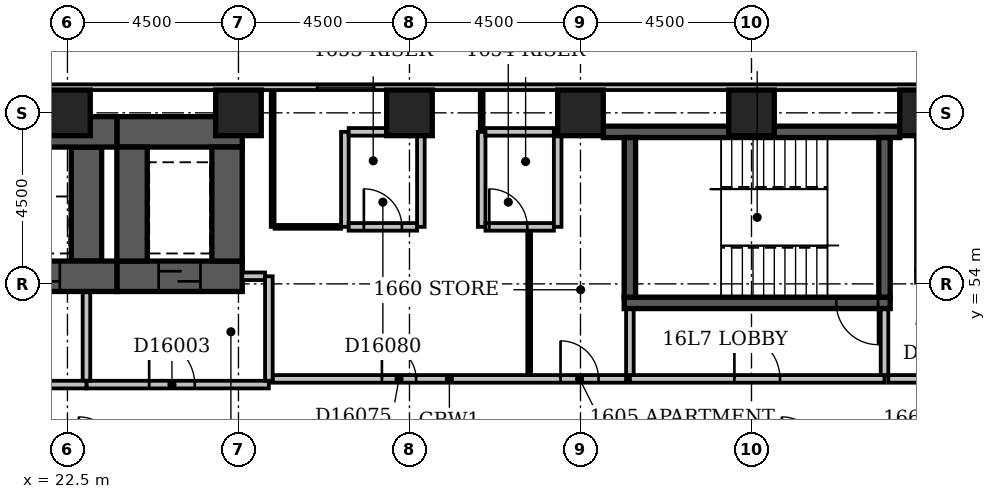
"""IFC4 building model, lengths in metres.
Left out: names, types, materials, properties, quantities, classifications, styles, units other than length and angle.
Written with IfcOpenShell. Run it as: python <this file> out.ifc"""

import sys

from ifc_helpers import new_model, si_unit, direction, frame, frame_2d, origin, origin_2d, place, context, subcontext, project, spatial, rectangle, extrude, element, fill, save


model = new_model("IFC4")
c1 = context("Model", 3, precision=1e-05, world=origin(), true_north=direction((0.0, 1.0)))
c2 = subcontext(c1, "Body", "Model", "MODEL_VIEW")
j1 = project(units=[si_unit("LENGTHUNIT", "METRE"), si_unit("PLANEANGLEUNIT", "RADIAN")], contexts=[c1])
p1 = place(None, origin())
s1 = spatial("IfcSite", under=j1, at=p1, CompositionType="ELEMENT")
p2 = place(p1, origin())
s2 = spatial("IfcBuilding", under=s1, at=p2, CompositionType="ELEMENT")
p3 = place(p2, frame((0.0, 0.0, 68.6)))
s3 = spatial("IfcBuildingStorey", under=s2, at=p3, CompositionType="ELEMENT", Elevation=68.6)
p4 = place(p3, frame((7.35, 54.2, -0.3), z_axis=(0.0, 0.0, 1.0), x_axis=(1.0, 0.0, 0.0)))
e1 = element("IfcWall", 1, at=p4, inside=s3, PredefinedType="SHEAR", context=c2, shape_type="SweptSolid", body=[
    extrude(rectangle(XDim=16.45, YDim=0.8, at=frame_2d((8.225, 0.0))), origin(), (0.0, 0.0, 1.0), 3.6),
])
p5 = place(p4, frame((1.35, 0.0, 0.3)))
e2 = element("IfcOpeningElement", 2, at=p5, cuts=e1, PredefinedType="OPENING", context=c2, shape_type="SweptSolid", body=[
    extrude(rectangle(XDim=1.1, YDim=2.1, at=frame_2d((0.55, 1.05))), frame((0.0, 0.412, 0.0), z_axis=(0.0, -1.0, 0.0), x_axis=(1.0, 0.0, 0.0)), (0.0, 0.0, 1.0), 0.824),
])
p6 = place(p4, frame((3.85, 0.0, 0.3)))
e3 = element("IfcOpeningElement", 3, at=p6, cuts=e1, PredefinedType="OPENING", context=c2, shape_type="SweptSolid", body=[
    extrude(rectangle(XDim=1.1, YDim=2.1, at=frame_2d((0.55, 1.05))), frame((0.0, 0.412, 0.0), z_axis=(0.0, -1.0, 0.0), x_axis=(1.0, 0.0, 0.0)), (0.0, 0.0, 1.0), 0.824),
])
p7 = place(p4, frame((6.35, 0.0, 0.3)))
e4 = element("IfcOpeningElement", 4, at=p7, cuts=e1, PredefinedType="OPENING", context=c2, shape_type="SweptSolid", body=[
    extrude(rectangle(XDim=1.1, YDim=2.1, at=frame_2d((0.55, 1.05))), frame((0.0, 0.412, 0.0), z_axis=(0.0, -1.0, 0.0), x_axis=(1.0, 0.0, 0.0)), (0.0, 0.0, 1.0), 0.824),
])
p8 = place(p4, frame((8.85, 0.0, 0.3)))
e5 = element("IfcOpeningElement", 5, at=p8, cuts=e1, PredefinedType="OPENING", context=c2, shape_type="SweptSolid", body=[
    extrude(rectangle(XDim=1.1, YDim=2.1, at=frame_2d((0.55, 1.05))), frame((0.0, 0.412, 0.0), z_axis=(0.0, -1.0, 0.0), x_axis=(1.0, 0.0, 0.0)), (0.0, 0.0, 1.0), 0.824),
])
p9 = place(p4, frame((11.35, 0.0, 0.3)))
e6 = element("IfcOpeningElement", 6, at=p9, cuts=e1, PredefinedType="OPENING", context=c2, shape_type="SweptSolid", body=[
    extrude(rectangle(XDim=1.1, YDim=2.1, at=frame_2d((0.55, 1.05))), frame((0.0, 0.412, 0.0), z_axis=(0.0, -1.0, 0.0), x_axis=(1.0, 0.0, 0.0)), (0.0, 0.0, 1.0), 0.824),
])
p10 = place(p4, frame((13.85, 0.0, 0.3)))
e7 = element("IfcOpeningElement", 7, at=p10, cuts=e1, PredefinedType="OPENING", context=c2, shape_type="SweptSolid", body=[
    extrude(rectangle(XDim=1.1, YDim=2.1, at=frame_2d((0.55, 1.05))), frame((0.0, 0.412, 0.0), z_axis=(0.0, -1.0, 0.0), x_axis=(1.0, 0.0, 0.0)), (0.0, 0.0, 1.0), 0.824),
])
p11 = place(p3, frame((7.35, 58.0, -0.3), z_axis=(0.0, 0.0, 1.0), x_axis=(1.0, 0.0, 0.0)))
e8 = element("IfcWall", 8, at=p11, inside=s3, PredefinedType="SHEAR", context=c2, shape_type="SweptSolid", body=[
    extrude(rectangle(XDim=16.45, YDim=0.8, at=frame_2d((8.225, 0.0))), origin(), (0.0, 0.0, 1.0), 3.6),
])
p12 = place(p3, frame((23.0, 54.6, -0.3), z_axis=(0.0, 0.0, 1.0), x_axis=(0.0, 1.0, 0.0)))
e9 = element("IfcWall", 9, at=p12, inside=s3, PredefinedType="SHEAR", context=c2, shape_type="SweptSolid", body=[
    extrude(rectangle(XDim=3.0, YDim=0.8, at=frame_2d((1.5, 0.0))), origin(), (0.0, 0.0, 1.0), 3.6),
])
p13 = place(p3, frame((23.8, 54.2, -0.3), z_axis=(0.0, 0.0, 1.0), x_axis=(1.0, 0.0, 0.0)))
e10 = element("IfcWall", 10, at=p13, inside=s3, PredefinedType="SHEAR", context=c2, shape_type="SweptSolid", body=[
    extrude(rectangle(XDim=3.3, YDim=0.8, at=frame_2d((1.65, 0.0))), origin(), (0.0, 0.0, 1.0), 3.6),
])
p14 = place(p13, frame((1.1, 0.0, 0.3)))
e11 = element("IfcOpeningElement", 11, at=p14, cuts=e10, PredefinedType="OPENING", context=c2, shape_type="SweptSolid", body=[
    extrude(rectangle(XDim=1.1, YDim=2.1, at=frame_2d((0.55, 1.05))), frame((0.0, 0.412, 0.0), z_axis=(0.0, -1.0, 0.0), x_axis=(1.0, 0.0, 0.0)), (0.0, 0.0, 1.0), 0.824),
])
p15 = place(p3, frame((23.8, 58.0, -0.3), z_axis=(0.0, 0.0, 1.0), x_axis=(1.0, 0.0, 0.0)))
e12 = element("IfcWall", 12, at=p15, inside=s3, PredefinedType="SHEAR", context=c2, shape_type="SweptSolid", body=[
    extrude(rectangle(XDim=3.3, YDim=0.8, at=frame_2d((1.65, 0.0))), origin(), (0.0, 0.0, 1.0), 3.6),
])
for number, where, z_axis, x_axis in (
    (13, (24.2, 54.6, -0.3), (0.0, 0.0, 1.0), (0.0, 1.0, 0.0)),
    (14, (26.7, 54.6, -0.3), (0.0, 0.0, 1.0), (0.0, 1.0, 0.0)),
):
    element("IfcWall", number, at=place(p3, frame(where, z_axis=z_axis, x_axis=x_axis)), inside=s3, PredefinedType="SHEAR", context=c2, shape_type="SweptSolid", body=[
        extrude(rectangle(XDim=3.0, YDim=0.8, at=frame_2d((1.5, 0.0))), origin(), (0.0, 0.0, 1.0), 3.6),
    ])
p16 = place(p3, frame((36.6, 58.0, -0.3), z_axis=(0.0, 0.0, 1.0), x_axis=(1.0, 0.0, 0.0)))
e15 = element("IfcWall", 15, at=p16, inside=s3, PredefinedType="SHEAR", context=c2, shape_type="SweptSolid", body=[
    extrude(rectangle(XDim=7.8, YDim=0.3, at=frame_2d((3.9, 0.0))), origin(), (0.0, 0.0, 1.0), 3.6),
])
p17 = place(p3, frame((37.15, 53.5, -0.3), z_axis=(0.0, 0.0, 1.0), x_axis=(1.0, 0.0, 0.0)))
e16 = element("IfcWall", 16, at=p17, inside=s3, PredefinedType="SHEAR", context=c2, shape_type="SweptSolid", body=[
    extrude(rectangle(XDim=7.0, YDim=0.3, at=frame_2d((3.5, 0.0))), origin(), (0.0, 0.0, 1.0), 3.6),
])
p18 = place(p17, frame((5.58, 0.0, 0.3)))
e17 = element("IfcOpeningElement", 17, at=p18, cuts=e16, PredefinedType="OPENING", context=c2, shape_type="SweptSolid", body=[
    extrude(rectangle(XDim=1.1, YDim=2.1, at=frame_2d((0.55, 1.05))), frame((0.0, 0.162, 0.0), z_axis=(0.0, -1.0, 0.0), x_axis=(1.0, 0.0, 0.0)), (0.0, 0.0, 1.0), 0.324),
])
for number, where, z_axis, x_axis in (
    (18, (37.3, 53.65, -0.3), (0.0, 0.0, 1.0), (0.0, 1.0, 0.0)),
    (19, (44.0, 53.65, -0.3), (0.0, 0.0, 1.0), (0.0, 1.0, 0.0)),
):
    element("IfcWall", number, at=place(p3, frame(where, z_axis=z_axis, x_axis=x_axis)), inside=s3, PredefinedType="SHEAR", context=c2, shape_type="SweptSolid", body=[
        extrude(rectangle(XDim=4.2, YDim=0.3, at=frame_2d((2.1, 0.0))), origin(), (0.0, 0.0, 1.0), 3.6),
    ])
p19 = place(p3, frame((45.0, 54.35, -0.3), z_axis=(0.0, 0.0, 1.0), x_axis=(0.0, 1.0, 0.0)))
e20 = element("IfcWall", 20, at=p19, inside=s3, PredefinedType="SHEAR", context=c2, shape_type="SweptSolid", body=[
    extrude(rectangle(XDim=3.5, YDim=0.3, at=frame_2d((1.75, 0.0))), origin(), (0.0, 0.0, 1.0), 3.6),
])
for number, where, z_axis, x_axis in (
    (21, (22.5, 58.5, -0.3), (0.0, 0.0, 1.0), (1.0, 0.0, 0.0)),
    (22, (27.0, 58.5, -0.3), (0.0, 0.0, 1.0), (1.0, 0.0, 0.0)),
    (23, (31.5, 58.5, -0.3), (0.0, 0.0, 1.0), (1.0, 0.0, 0.0)),
    (24, (36.0, 58.5, -0.3), (0.0, 0.0, 1.0), (1.0, 0.0, 0.0)),
    (25, (40.5, 58.5, -0.3), (0.0, 0.0, 1.0), (1.0, 0.0, 0.0)),
    (26, (45.0, 58.5, -0.3), (0.0, 0.0, 1.0), (1.0, 0.0, 0.0)),
):
    element("IfcColumn", number, at=place(p3, frame(where, z_axis=z_axis, x_axis=x_axis)), inside=s3, PredefinedType="COLUMN", context=c2, shape_type="SweptSolid", body=[
        extrude(rectangle(XDim=1.2, YDim=1.2, at=origin_2d()), origin(), (0.0, 0.0, 1.0), 3.6),
    ])
p20 = place(p3, frame((68.1, 59.175, 0.0), z_axis=(0.0, 0.0, 1.0), x_axis=(-1.0, 0.0, 0.0)))
e27 = element("IfcWall", 27, at=p20, inside=s3, PredefinedType="STANDARD", context=c2, shape_type="SweptSolid", body=[
    extrude(rectangle(XDim=68.85, YDim=0.15, at=frame_2d((34.425, 0.0))), origin(), (0.0, 0.0, 1.0), 2.7),
])
p21 = place(p20, frame((1.65, 0.0, 0.6)))
e28 = element("IfcOpeningElement", 28, at=p21, cuts=e27, PredefinedType="OPENING", context=c2, shape_type="SweptSolid", body=[
    extrude(rectangle(XDim=2.4, YDim=1.8, at=frame_2d((1.2, 0.9))), frame((0.0, 0.087, 0.0), z_axis=(0.0, -1.0, 0.0), x_axis=(1.0, 0.0, 0.0)), (0.0, 0.0, 1.0), 0.174),
])
p22 = place(p20, frame((6.15, 0.0, 0.6)))
e29 = element("IfcOpeningElement", 29, at=p22, cuts=e27, PredefinedType="OPENING", context=c2, shape_type="SweptSolid", body=[
    extrude(rectangle(XDim=2.4, YDim=1.8, at=frame_2d((1.2, 0.9))), frame((0.0, 0.087, 0.0), z_axis=(0.0, -1.0, 0.0), x_axis=(1.0, 0.0, 0.0)), (0.0, 0.0, 1.0), 0.174),
])
p23 = place(p20, frame((37.53, 0.0, 0.6)))
e30 = element("IfcOpeningElement", 30, at=p23, cuts=e27, PredefinedType="OPENING", context=c2, shape_type="SweptSolid", body=[
    extrude(rectangle(XDim=1.5, YDim=1.8, at=frame_2d((0.75, 0.9))), frame((0.0, 0.087, 0.0), z_axis=(0.0, -1.0, 0.0), x_axis=(1.0, 0.0, 0.0)), (0.0, 0.0, 1.0), 0.174),
])
p24 = place(p3, frame((8.0, 51.35, 0.0), z_axis=(0.0, 0.0, 1.0), x_axis=(1.0, 0.0, 0.0)))
e31 = element("IfcWall", 31, at=p24, inside=s3, PredefinedType="PARTITIONING", context=c2, shape_type="SweptSolid", body=[
    extrude(rectangle(XDim=15.0, YDim=0.2, at=frame_2d((7.5, 0.0))), origin(), (0.0, 0.0, 1.0), 3.3),
])
p25 = place(p24, frame((3.4, 0.0, 0.0)))
e32 = element("IfcOpeningElement", 32, at=p25, cuts=e31, PredefinedType="OPENING", context=c2, shape_type="SweptSolid", body=[
    extrude(rectangle(XDim=1.2, YDim=2.1, at=frame_2d((0.6, 1.05))), frame((0.0, 0.112, 0.0), z_axis=(0.0, -1.0, 0.0), x_axis=(1.0, 0.0, 0.0)), (0.0, 0.0, 1.0), 0.224),
])
p26 = place(p24, frame((9.4, 0.0, 0.0)))
e33 = element("IfcOpeningElement", 33, at=p26, cuts=e31, PredefinedType="OPENING", context=c2, shape_type="SweptSolid", body=[
    extrude(rectangle(XDim=1.2, YDim=2.1, at=frame_2d((0.6, 1.05))), frame((0.0, 0.112, 0.0), z_axis=(0.0, -1.0, 0.0), x_axis=(1.0, 0.0, 0.0)), (0.0, 0.0, 1.0), 0.224),
])
p27 = place(p3, frame((23.0, 51.45, 0.0), z_axis=(0.0, 0.0, 1.0), x_axis=(0.0, 1.0, 0.0)))
e34 = element("IfcWall", 34, at=p27, inside=s3, PredefinedType="PARTITIONING", context=c2, shape_type="SweptSolid", body=[
    extrude(rectangle(XDim=2.33, YDim=0.2, at=frame_2d((1.165, 0.0))), origin(), (0.0, 0.0, 1.0), 3.3),
])
p28 = place(p3, frame((23.0, 51.35, 0.0), z_axis=(0.0, 0.0, 1.0), x_axis=(1.0, 0.0, 0.0)))
e35 = element("IfcWall", 35, at=p28, inside=s3, PredefinedType="PARTITIONING", context=c2, shape_type="SweptSolid", body=[
    extrude(rectangle(XDim=4.8, YDim=0.2, at=frame_2d((2.4, 0.0))), origin(), (0.0, 0.0, 1.0), 3.3),
])
p29 = place(p28, frame((1.65, 0.0, 0.0)))
e36 = element("IfcOpeningElement", 36, at=p29, cuts=e35, PredefinedType="OPENING", context=c2, shape_type="SweptSolid", body=[
    extrude(rectangle(XDim=1.2, YDim=2.1, at=frame_2d((0.6, 1.05))), frame((0.0, 0.112, 0.0), z_axis=(0.0, -1.0, 0.0), x_axis=(1.0, 0.0, 0.0)), (0.0, 0.0, 1.0), 0.224),
])
p30 = place(p3, frame((27.8, 51.45, 0.0), z_axis=(0.0, 0.0, 1.0), x_axis=(0.0, 1.0, 0.0)))
e37 = element("IfcWall", 37, at=p30, inside=s3, PredefinedType="PARTITIONING", context=c2, shape_type="SweptSolid", body=[
    extrude(rectangle(XDim=2.75, YDim=0.2, at=frame_2d((1.375, 0.0))), origin(), (0.0, 0.0, 1.0), 3.3),
])
p31 = place(p3, frame((27.1, 54.2, 0.0), z_axis=(0.0, 0.0, 1.0), x_axis=(1.0, 0.0, 0.0)))
e38 = element("IfcWall", 38, at=p31, inside=s3, PredefinedType="PARTITIONING", context=c2, shape_type="SweptSolid", body=[
    extrude(rectangle(XDim=0.6, YDim=0.2, at=frame_2d((0.3, 0.0))), origin(), (0.0, 0.0, 1.0), 3.3),
])
p32 = place(p3, frame((37.3, 51.5, 0.0), z_axis=(0.0, 0.0, 1.0), x_axis=(1.0, 0.0, 0.0)))
e39 = element("IfcWall", 39, at=p32, inside=s3, PredefinedType="PARTITIONING", context=c2, shape_type="SweptSolid", body=[
    extrude(rectangle(XDim=6.7, YDim=0.2, at=frame_2d((3.35, 0.0))), origin(), (0.0, 0.0, 1.0), 3.3),
])
p33 = place(p32, frame((2.75, 0.0, 0.0)))
e40 = element("IfcOpeningElement", 40, at=p33, cuts=e39, PredefinedType="OPENING", context=c2, shape_type="SweptSolid", body=[
    extrude(rectangle(XDim=1.2, YDim=2.1, at=frame_2d((0.6, 1.05))), frame((0.0, 0.112, 0.0), z_axis=(0.0, -1.0, 0.0), x_axis=(1.0, 0.0, 0.0)), (0.0, 0.0, 1.0), 0.224),
])
for number, where, z_axis, x_axis in (
    (41, (44.0, 51.6, 0.0), (0.0, 0.0, 1.0), (0.0, 1.0, 0.0)),
    (42, (37.3, 51.6, 0.0), (0.0, 0.0, 1.0), (0.0, 1.0, 0.0)),
):
    element("IfcWall", number, at=place(p3, frame(where, z_axis=z_axis, x_axis=x_axis)), inside=s3, PredefinedType="PARTITIONING", context=c2, shape_type="SweptSolid", body=[
        extrude(rectangle(XDim=1.73, YDim=0.2, at=frame_2d((0.865, 0.0))), origin(), (0.0, 0.0, 1.0), 3.3),
    ])
p34 = place(p3, frame((27.9, 51.5, 0.0), z_axis=(0.0, 0.0, 1.0), x_axis=(1.0, 0.0, 0.0)))
e43 = element("IfcWall", 43, at=p34, inside=s3, PredefinedType="PARTITIONING", context=c2, shape_type="SweptSolid", body=[
    extrude(rectangle(XDim=9.3, YDim=0.2, at=frame_2d((4.65, 0.0))), origin(), (0.0, 0.0, 1.0), 3.3),
])
p35 = place(p34, frame((2.875, 0.0, 0.0)))
e44 = element("IfcOpeningElement", 44, at=p35, cuts=e43, PredefinedType="OPENING", context=c2, shape_type="SweptSolid", body=[
    extrude(rectangle(XDim=0.9, YDim=2.1, at=frame_2d((0.45, 1.05))), frame((0.0, 0.112, 0.0), z_axis=(0.0, -1.0, 0.0), x_axis=(1.0, 0.0, 0.0)), (0.0, 0.0, 1.0), 0.224),
])
p36 = place(p34, frame((7.575, 0.0, 0.0)))
e45 = element("IfcOpeningElement", 45, at=p36, cuts=e43, PredefinedType="OPENING", context=c2, shape_type="SweptSolid", body=[
    extrude(rectangle(XDim=1.0, YDim=2.1, at=frame_2d((0.5, 1.05))), frame((0.0, 0.112, 0.0), z_axis=(0.0, -1.0, 0.0), x_axis=(1.0, 0.0, 0.0)), (0.0, 0.0, 1.0), 0.224),
])
p37 = place(p3, frame((44.1, 51.5, 0.0), z_axis=(0.0, 0.0, 1.0), x_axis=(1.0, 0.0, 0.0)))
e46 = element("IfcWall", 46, at=p37, inside=s3, PredefinedType="PARTITIONING", context=c2, shape_type="SweptSolid", body=[
    extrude(rectangle(XDim=2.8, YDim=0.2, at=frame_2d((1.4, 0.0))), origin(), (0.0, 0.0, 1.0), 3.3),
])
p38 = place(p37, frame((0.95, 0.0, 0.0)))
e47 = element("IfcOpeningElement", 47, at=p38, cuts=e46, PredefinedType="OPENING", context=c2, shape_type="SweptSolid", body=[
    extrude(rectangle(XDim=0.9, YDim=2.1, at=frame_2d((0.45, 1.05))), frame((0.0, 0.112, 0.0), z_axis=(0.0, -1.0, 0.0), x_axis=(1.0, 0.0, 0.0)), (0.0, 0.0, 1.0), 0.224),
])
p39 = place(p3, frame((34.65, 51.6, 0.0), z_axis=(0.0, 0.0, 1.0), x_axis=(0.0, 1.0, 0.0)))
e48 = element("IfcWall", 48, at=p39, inside=s3, PredefinedType="PARTITIONING", context=c2, shape_type="SweptSolid", body=[
    extrude(rectangle(XDim=3.8, YDim=0.1, at=frame_2d((1.9, 0.0))), origin(), (0.0, 0.0, 1.0), 3.3),
])
p40 = place(p3, frame((27.9, 55.5, 0.0), z_axis=(0.0, 0.0, 1.0), x_axis=(0.0, 1.0, 0.0)))
e49 = element("IfcWall", 49, at=p40, inside=s3, PredefinedType="PARTITIONING", context=c2, shape_type="SweptSolid", body=[
    extrude(rectangle(XDim=3.6, YDim=0.1, at=frame_2d((1.8, 0.0))), origin(), (0.0, 0.0, 1.0), 3.3),
])
p41 = place(p3, frame((27.95, 55.5, 0.0), z_axis=(0.0, 0.0, 1.0), x_axis=(1.0, 0.0, 0.0)))
e50 = element("IfcWall", 50, at=p41, inside=s3, PredefinedType="PARTITIONING", context=c2, shape_type="SweptSolid", body=[
    extrude(rectangle(XDim=1.75, YDim=0.1, at=frame_2d((0.875, 0.0))), origin(), (0.0, 0.0, 1.0), 3.3),
])
p42 = place(p3, frame((29.8, 55.5, 0.0), z_axis=(0.0, 0.0, 1.0), x_axis=(0.0, 1.0, 0.0)))
e51 = element("IfcWall", 51, at=p42, inside=s3, PredefinedType="PARTITIONING", context=c2, shape_type="SweptSolid", body=[
    extrude(rectangle(XDim=2.5, YDim=0.2, at=frame_2d((1.25, 0.0))), origin(), (0.0, 0.0, 1.0), 3.3),
])
p43 = place(p3, frame((29.9, 55.5, 0.0), z_axis=(0.0, 0.0, 1.0), x_axis=(1.0, 0.0, 0.0)))
e52 = element("IfcWall", 52, at=p43, inside=s3, PredefinedType="PARTITIONING", context=c2, shape_type="SweptSolid", body=[
    extrude(rectangle(XDim=1.8, YDim=0.2, at=frame_2d((0.9, 0.0))), origin(), (0.0, 0.0, 1.0), 3.3),
])
p44 = place(p43, frame((0.4, 0.0, 0.0)))
e53 = element("IfcOpeningElement", 53, at=p44, cuts=e52, PredefinedType="OPENING", context=c2, shape_type="SweptSolid", body=[
    extrude(rectangle(XDim=1.0, YDim=2.1, at=frame_2d((0.5, 1.05))), frame((0.0, 0.112, 0.0), z_axis=(0.0, -1.0, 0.0), x_axis=(1.0, 0.0, 0.0)), (0.0, 0.0, 1.0), 0.224),
])
for number, where, z_axis, x_axis in (
    (54, (31.8, 55.5, 0.0), (0.0, 0.0, 1.0), (0.0, 1.0, 0.0)),
    (55, (33.4, 55.5, 0.0), (0.0, 0.0, 1.0), (0.0, 1.0, 0.0)),
):
    element("IfcWall", number, at=place(p3, frame(where, z_axis=z_axis, x_axis=x_axis)), inside=s3, PredefinedType="PARTITIONING", context=c2, shape_type="SweptSolid", body=[
        extrude(rectangle(XDim=2.5, YDim=0.2, at=frame_2d((1.25, 0.0))), origin(), (0.0, 0.0, 1.0), 3.3),
    ])
p45 = place(p3, frame((33.5, 55.5, 0.0), z_axis=(0.0, 0.0, 1.0), x_axis=(1.0, 0.0, 0.0)))
e56 = element("IfcWall", 56, at=p45, inside=s3, PredefinedType="PARTITIONING", context=c2, shape_type="SweptSolid", body=[
    extrude(rectangle(XDim=1.8, YDim=0.2, at=frame_2d((0.9, 0.0))), origin(), (0.0, 0.0, 1.0), 3.3),
])
p46 = place(p45, frame((0.1, 0.0, 0.0)))
e57 = element("IfcOpeningElement", 57, at=p46, cuts=e56, PredefinedType="OPENING", context=c2, shape_type="SweptSolid", body=[
    extrude(rectangle(XDim=1.0, YDim=2.1, at=frame_2d((0.5, 1.05))), frame((0.0, 0.112, 0.0), z_axis=(0.0, -1.0, 0.0), x_axis=(1.0, 0.0, 0.0)), (0.0, 0.0, 1.0), 0.224),
])
p47 = place(p3, frame((35.4, 55.5, 0.0), z_axis=(0.0, 0.0, 1.0), x_axis=(0.0, 1.0, 0.0)))
e58 = element("IfcWall", 58, at=p47, inside=s3, PredefinedType="PARTITIONING", context=c2, shape_type="SweptSolid", body=[
    extrude(rectangle(XDim=2.5, YDim=0.2, at=frame_2d((1.25, 0.0))), origin(), (0.0, 0.0, 1.0), 2.4),
])
p48 = place(p3, frame((29.9, 58.0, 0.0), z_axis=(0.0, 0.0, 1.0), x_axis=(1.0, 0.0, 0.0)))
e59 = element("IfcWall", 59, at=p48, inside=s3, PredefinedType="PARTITIONING", context=c2, shape_type="SweptSolid", body=[
    extrude(rectangle(XDim=1.8, YDim=0.2, at=frame_2d((0.9, 0.0))), origin(), (0.0, 0.0, 1.0), 3.3),
])
p49 = place(p3, frame((33.4, 58.0, 0.0), z_axis=(0.0, 0.0, 1.0), x_axis=(0.0, 1.0, 0.0)))
e60 = element("IfcWall", 60, at=p49, inside=s3, PredefinedType="PARTITIONING", context=c2, shape_type="SweptSolid", body=[
    extrude(rectangle(XDim=1.1, YDim=0.1, at=frame_2d((0.55, 0.0))), origin(), (0.0, 0.0, 1.0), 3.3),
])
p50 = place(p3, frame((33.5, 58.0, 0.0), z_axis=(0.0, 0.0, 1.0), x_axis=(1.0, 0.0, 0.0)))
e61 = element("IfcWall", 61, at=p50, inside=s3, PredefinedType="PARTITIONING", context=c2, shape_type="SweptSolid", body=[
    extrude(rectangle(XDim=1.8, YDim=0.2, at=frame_2d((0.9, 0.0))), origin(), (0.0, 0.0, 1.0), 3.3),
])
p51 = place(p23, origin())
e62 = element("IfcWindow", 62, at=p51, inside=s3, PartitioningType="SINGLE_PANEL", PredefinedType="WINDOW", context=c2, shape_type="SweptSolid", body=[
    extrude(rectangle(XDim=1.5, YDim=1.8, at=frame_2d((0.75, 0.9))), frame((0.0, 0.03, 0.0), z_axis=(0.0, -1.0, 0.0), x_axis=(1.0, 0.0, 0.0)), (0.0, 0.0, 1.0), 0.06),
])
fill(e30, e62)
p52 = place(p29, origin())
e63 = element("IfcDoor", 63, at=p52, inside=s3, OperationType="SINGLE_SWING_LEFT", PredefinedType="DOOR", context=c2, shape_type="SweptSolid", body=[
    extrude(rectangle(XDim=1.2, YDim=2.1, at=frame_2d((0.6, 1.05))), frame((0.0, 0.025, 0.0), z_axis=(0.0, -1.0, 0.0), x_axis=(1.0, 0.0, 0.0)), (0.0, 0.0, 1.0), 0.05),
])
fill(e36, e63)
p53 = place(p14, origin())
e64 = element("IfcDoor", 64, at=p53, inside=s3, OperationType="SLIDING_TO_LEFT", PredefinedType="DOOR", context=c2, shape_type="SweptSolid", body=[
    extrude(rectangle(XDim=1.1, YDim=2.1, at=frame_2d((0.55, 1.05))), frame((0.0, 0.025, 0.0), z_axis=(0.0, -1.0, 0.0), x_axis=(1.0, 0.0, 0.0)), (0.0, 0.0, 1.0), 0.05),
])
fill(e11, e64)
p54 = place(p10, origin())
e65 = element("IfcDoor", 65, at=p54, inside=s3, OperationType="SLIDING_TO_LEFT", PredefinedType="DOOR", context=c2, shape_type="SweptSolid", body=[
    extrude(rectangle(XDim=1.1, YDim=2.1, at=frame_2d((0.55, 1.05))), frame((0.0, 0.025, 0.0), z_axis=(0.0, -1.0, 0.0), x_axis=(1.0, 0.0, 0.0)), (0.0, 0.0, 1.0), 0.05),
])
fill(e7, e65)
p55 = place(p33, origin())
e66 = element("IfcDoor", 66, at=p55, inside=s3, OperationType="SINGLE_SWING_LEFT", PredefinedType="DOOR", context=c2, shape_type="SweptSolid", body=[
    extrude(rectangle(XDim=1.2, YDim=2.1, at=frame_2d((0.6, 1.05))), frame((0.0, 0.025, 0.0), z_axis=(0.0, -1.0, 0.0), x_axis=(1.0, 0.0, 0.0)), (0.0, 0.0, 1.0), 0.05),
])
fill(e40, e66)
p56 = place(p18, origin())
e67 = element("IfcDoor", 67, at=p56, inside=s3, OperationType="SINGLE_SWING_RIGHT", PredefinedType="DOOR", context=c2, shape_type="SweptSolid", body=[
    extrude(rectangle(XDim=1.1, YDim=2.1, at=frame_2d((0.55, 1.05))), frame((0.0, 0.025, 0.0), z_axis=(0.0, -1.0, 0.0), x_axis=(1.0, 0.0, 0.0)), (0.0, 0.0, 1.0), 0.05),
])
fill(e17, e67)
p57 = place(p35, origin())
e68 = element("IfcDoor", 68, at=p57, inside=s3, OperationType="SINGLE_SWING_LEFT", PredefinedType="DOOR", context=c2, shape_type="SweptSolid", body=[
    extrude(rectangle(XDim=0.9, YDim=2.1, at=frame_2d((0.45, 1.05))), frame((0.0, 0.025, 0.0), z_axis=(0.0, -1.0, 0.0), x_axis=(1.0, 0.0, 0.0)), (0.0, 0.0, 1.0), 0.05),
])
fill(e44, e68)
p58 = place(p36, origin())
e69 = element("IfcDoor", 69, at=p58, inside=s3, OperationType="SINGLE_SWING_LEFT", PredefinedType="DOOR", context=c2, shape_type="SweptSolid", body=[
    extrude(rectangle(XDim=1.0, YDim=2.1, at=frame_2d((0.5, 1.05))), frame((0.0, 0.025, 0.0), z_axis=(0.0, -1.0, 0.0), x_axis=(1.0, 0.0, 0.0)), (0.0, 0.0, 1.0), 0.05),
])
fill(e45, e69)
p59 = place(p44, origin())
e70 = element("IfcDoor", 70, at=p59, inside=s3, OperationType="SINGLE_SWING_LEFT", PredefinedType="DOOR", context=c2, shape_type="SweptSolid", body=[
    extrude(rectangle(XDim=1.0, YDim=2.1, at=frame_2d((0.5, 1.05))), frame((0.0, 0.025, 0.0), z_axis=(0.0, -1.0, 0.0), x_axis=(1.0, 0.0, 0.0)), (0.0, 0.0, 1.0), 0.05),
])
fill(e53, e70)
p60 = place(p46, origin())
e71 = element("IfcDoor", 71, at=p60, inside=s3, OperationType="SINGLE_SWING_LEFT", PredefinedType="DOOR", context=c2, shape_type="SweptSolid", body=[
    extrude(rectangle(XDim=1.0, YDim=2.1, at=frame_2d((0.5, 1.05))), frame((0.0, 0.025, 0.0), z_axis=(0.0, -1.0, 0.0), x_axis=(1.0, 0.0, 0.0)), (0.0, 0.0, 1.0), 0.05),
])
fill(e57, e71)
save(model, sys.argv[1])
